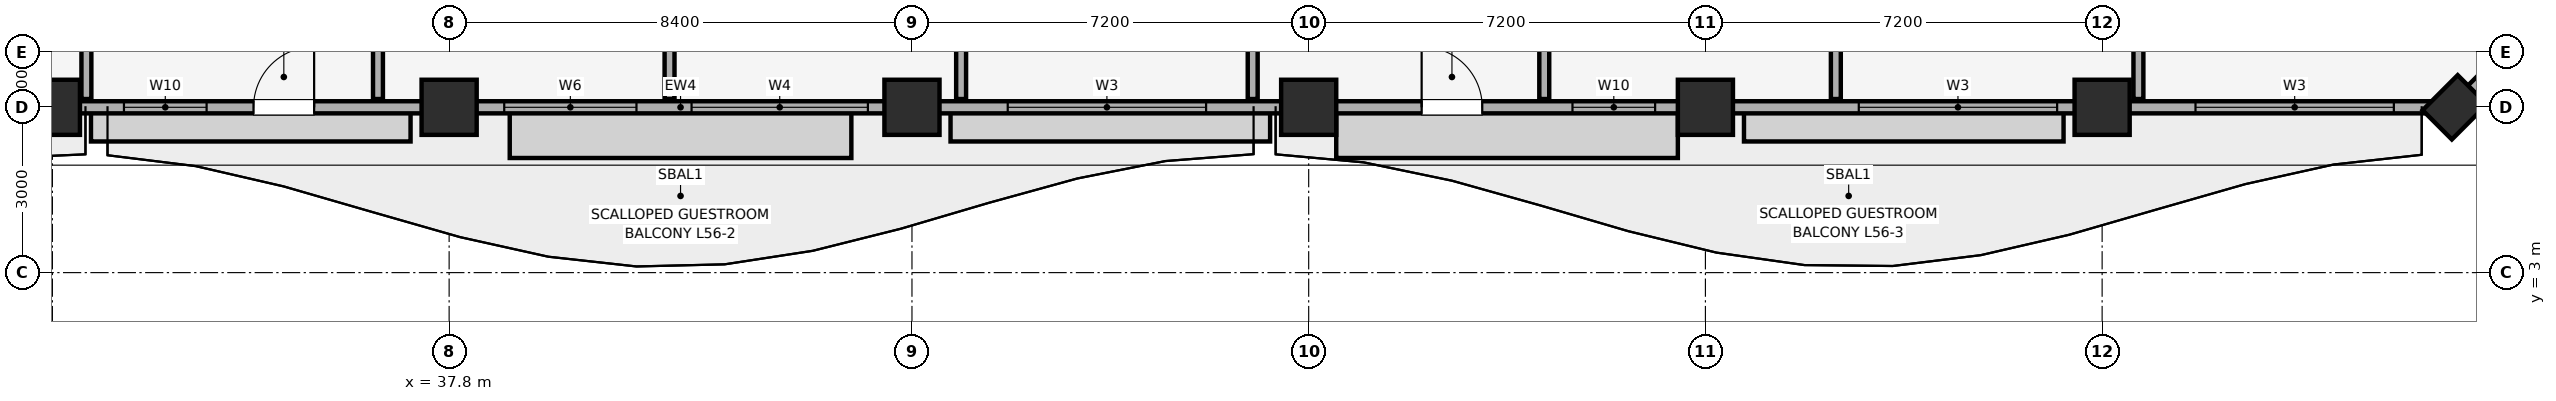
"""IFC4 building model, lengths in metres.
Left out: names, types, materials, properties, quantities, classifications, styles, units other than length and angle.
Written with IfcOpenShell. Run it as: python <this file> out.ifc"""

import sys

from ifc_helpers import new_model, si_unit, direction, frame, frame_2d, origin, origin_2d, place, context, subcontext, project, spatial, rectangle, extrude, element, fill, save


model = new_model("IFC4")
c1 = context("Model", 3, precision=1e-05, world=origin(), true_north=direction((0.0, 1.0)))
c2 = subcontext(c1, "Body", "Model", "MODEL_VIEW")
j1 = project(units=[si_unit("LENGTHUNIT", "METRE"), si_unit("PLANEANGLEUNIT", "RADIAN")], contexts=[c1])
p1 = place(None, origin())
s1 = spatial("IfcSite", under=j1, at=p1, CompositionType="ELEMENT")
p2 = place(p1, origin())
s2 = spatial("IfcBuilding", under=s1, at=p2, CompositionType="ELEMENT")
p3 = place(p2, frame((0.0, 0.0, 229.15)))
s3 = spatial("IfcBuildingStorey", under=s2, at=p3, CompositionType="ELEMENT", Elevation=229.15)
for number, where, z_axis, x_axis in (
    (1, (30.6, 6.0, 0.0), (0.0, 0.0, 1.0), (1.0, 0.0, 0.0)),
    (2, (37.8, 6.0, 0.0), (0.0, 0.0, 1.0), (1.0, 0.0, 0.0)),
    (3, (46.2, 6.0, 0.0), (0.0, 0.0, 1.0), (1.0, 0.0, 0.0)),
    (4, (53.4, 6.0, 0.0), (0.0, 0.0, 1.0), (1.0, 0.0, 0.0)),
    (5, (60.6, 6.0, 0.0), (0.0, 0.0, 1.0), (1.0, 0.0, 0.0)),
    (6, (67.8, 6.0, 0.0), (0.0, 0.0, 1.0), (1.0, 0.0, 0.0)),
):
    element("IfcColumn", number, at=place(p3, frame(where, z_axis=z_axis, x_axis=x_axis)), inside=s3, PredefinedType="COLUMN", context=c2, shape_type="SweptSolid", body=[
        extrude(rectangle(XDim=1.0, YDim=1.0, at=origin_2d()), origin(), (0.0, 0.0, 1.0), 3.71),
    ])
p4 = place(p3, frame((74.2, 6.0, 0.0), z_axis=(0.0, 0.0, 1.0), x_axis=(0.707106781187, 0.707106781187, 0.0)))
e7 = element("IfcColumn", 7, at=p4, inside=s3, PredefinedType="PILASTER", context=c2, shape_type="SweptSolid", body=[
    extrude(rectangle(XDim=0.9, YDim=0.75, at=origin_2d()), origin(), (0.0, 0.0, 1.0), 3.71),
])
p5 = place(p3, frame((9.8, 6.0, 0.0), z_axis=(0.0, 0.0, 1.0), x_axis=(1.0, 0.0, 0.0)))
e8 = element("IfcWall", 8, at=p5, inside=s3, PredefinedType="SOLIDWALL", context=c2, shape_type="SweptSolid", body=[
    extrude(rectangle(XDim=64.4, YDim=0.22, at=frame_2d((32.2, 0.0))), origin(), (0.0, 0.0, 1.0), 2.91),
])
p6 = place(p5, frame((3.25, 0.0, 0.0)))
e9 = element("IfcOpeningElement", 9, at=p6, cuts=e8, PredefinedType="OPENING", context=c2, shape_type="SweptSolid", body=[
    extrude(rectangle(XDim=1.1, YDim=2.15, at=frame_2d((0.55, 1.075))), frame((0.0, 0.12, 0.0), z_axis=(0.0, -1.0, 0.0), x_axis=(1.0, 0.0, 0.0)), (0.0, 0.0, 1.0), 0.24),
])
p7 = place(p5, frame((24.45, 0.0, 0.0)))
e10 = element("IfcOpeningElement", 10, at=p7, cuts=e8, PredefinedType="OPENING", context=c2, shape_type="SweptSolid", body=[
    extrude(rectangle(XDim=1.1, YDim=2.15, at=frame_2d((0.55, 1.075))), frame((0.0, 0.12, 0.0), z_axis=(0.0, -1.0, 0.0), x_axis=(1.0, 0.0, 0.0)), (0.0, 0.0, 1.0), 0.24),
])
p8 = place(p5, frame((45.65, 0.0, 0.0)))
e11 = element("IfcOpeningElement", 11, at=p8, cuts=e8, PredefinedType="OPENING", context=c2, shape_type="SweptSolid", body=[
    extrude(rectangle(XDim=1.1, YDim=2.15, at=frame_2d((0.55, 1.075))), frame((0.0, 0.12, 0.0), z_axis=(0.0, -1.0, 0.0), x_axis=(1.0, 0.0, 0.0)), (0.0, 0.0, 1.0), 0.24),
])
p9 = place(p5, frame((0.825, 0.0, 0.85)))
e12 = element("IfcOpeningElement", 12, at=p9, cuts=e8, PredefinedType="OPENING", context=c2, shape_type="SweptSolid", body=[
    extrude(rectangle(XDim=1.5, YDim=1.4, at=frame_2d((0.75, 0.7))), frame((0.0, 0.12, 0.0), z_axis=(0.0, -1.0, 0.0), x_axis=(1.0, 0.0, 0.0)), (0.0, 0.0, 1.0), 0.24),
])
p10 = place(p5, frame((7.217, 0.0, 0.85)))
e13 = element("IfcOpeningElement", 13, at=p10, cuts=e8, PredefinedType="OPENING", context=c2, shape_type="SweptSolid", body=[
    extrude(rectangle(XDim=3.2, YDim=1.85, at=frame_2d((1.6, 0.925))), frame((0.0, 0.12, 0.0), z_axis=(0.0, -1.0, 0.0), x_axis=(1.0, 0.0, 0.0)), (0.0, 0.0, 1.0), 0.24),
])
p11 = place(p5, frame((11.267, 0.0, 0.85)))
e14 = element("IfcOpeningElement", 14, at=p11, cuts=e8, PredefinedType="OPENING", context=c2, shape_type="SweptSolid", body=[
    extrude(rectangle(XDim=1.5, YDim=1.4, at=frame_2d((0.75, 0.7))), frame((0.0, 0.12, 0.0), z_axis=(0.0, -1.0, 0.0), x_axis=(1.0, 0.0, 0.0)), (0.0, 0.0, 1.0), 0.24),
])
p12 = place(p5, frame((16.663, 0.0, 0.85)))
e15 = element("IfcOpeningElement", 15, at=p12, cuts=e8, PredefinedType="OPENING", context=c2, shape_type="SweptSolid", body=[
    extrude(rectangle(XDim=3.2, YDim=1.85, at=frame_2d((1.6, 0.925))), frame((0.0, 0.12, 0.0), z_axis=(0.0, -1.0, 0.0), x_axis=(1.0, 0.0, 0.0)), (0.0, 0.0, 1.0), 0.24),
])
p13 = place(p5, frame((22.098, 0.0, 0.85)))
e16 = element("IfcOpeningElement", 16, at=p13, cuts=e8, PredefinedType="OPENING", context=c2, shape_type="SweptSolid", body=[
    extrude(rectangle(XDim=1.5, YDim=1.4, at=frame_2d((0.75, 0.7))), frame((0.0, 0.12, 0.0), z_axis=(0.0, -1.0, 0.0), x_axis=(1.0, 0.0, 0.0)), (0.0, 0.0, 1.0), 0.24),
])
p14 = place(p5, frame((29.0, 0.0, 0.85)))
e17 = element("IfcOpeningElement", 17, at=p14, cuts=e8, PredefinedType="OPENING", context=c2, shape_type="SweptSolid", body=[
    extrude(rectangle(XDim=2.4, YDim=1.5, at=frame_2d((1.2, 0.75))), frame((0.0, 0.12, 0.0), z_axis=(0.0, -1.0, 0.0), x_axis=(1.0, 0.0, 0.0)), (0.0, 0.0, 1.0), 0.24),
])
p15 = place(p5, frame((32.4, 0.0, 0.85)))
e18 = element("IfcOpeningElement", 18, at=p15, cuts=e8, PredefinedType="OPENING", context=c2, shape_type="SweptSolid", body=[
    extrude(rectangle(XDim=3.2, YDim=1.85, at=frame_2d((1.6, 0.925))), frame((0.0, 0.12, 0.0), z_axis=(0.0, -1.0, 0.0), x_axis=(1.0, 0.0, 0.0)), (0.0, 0.0, 1.0), 0.24),
])
p16 = place(p5, frame((38.138, 0.0, 0.85)))
e19 = element("IfcOpeningElement", 19, at=p16, cuts=e8, PredefinedType="OPENING", context=c2, shape_type="SweptSolid", body=[
    extrude(rectangle(XDim=3.6, YDim=1.75, at=frame_2d((1.8, 0.875))), frame((0.0, 0.12, 0.0), z_axis=(0.0, -1.0, 0.0), x_axis=(1.0, 0.0, 0.0)), (0.0, 0.0, 1.0), 0.24),
])
p17 = place(p5, frame((48.387, 0.0, 0.85)))
e20 = element("IfcOpeningElement", 20, at=p17, cuts=e8, PredefinedType="OPENING", context=c2, shape_type="SweptSolid", body=[
    extrude(rectangle(XDim=1.5, YDim=1.4, at=frame_2d((0.75, 0.7))), frame((0.0, 0.12, 0.0), z_axis=(0.0, -1.0, 0.0), x_axis=(1.0, 0.0, 0.0)), (0.0, 0.0, 1.0), 0.24),
])
p18 = place(p5, frame((53.583, 0.0, 0.85)))
e21 = element("IfcOpeningElement", 21, at=p18, cuts=e8, PredefinedType="OPENING", context=c2, shape_type="SweptSolid", body=[
    extrude(rectangle(XDim=3.6, YDim=1.75, at=frame_2d((1.8, 0.875))), frame((0.0, 0.12, 0.0), z_axis=(0.0, -1.0, 0.0), x_axis=(1.0, 0.0, 0.0)), (0.0, 0.0, 1.0), 0.24),
])
p19 = place(p5, frame((59.695, 0.0, 0.85)))
e22 = element("IfcOpeningElement", 22, at=p19, cuts=e8, PredefinedType="OPENING", context=c2, shape_type="SweptSolid", body=[
    extrude(rectangle(XDim=3.6, YDim=1.75, at=frame_2d((1.8, 0.875))), frame((0.0, 0.12, 0.0), z_axis=(0.0, -1.0, 0.0), x_axis=(1.0, 0.0, 0.0)), (0.0, 0.0, 1.0), 0.24),
])
p20 = place(p3, frame((74.2, 6.0, 0.0), z_axis=(0.0, 0.0, 1.0), x_axis=(0.707106781187, 0.707106781187, 0.0)))
e23 = element("IfcWall", 23, at=p20, inside=s3, PredefinedType="SOLIDWALL", context=c2, shape_type="SweptSolid", body=[
    extrude(rectangle(XDim=5.374, YDim=0.22, at=frame_2d((2.687, 0.0))), origin(), (0.0, 0.0, 1.0), 2.91),
])
p21 = place(p20, frame((1.637, 0.0, 0.85)))
e24 = element("IfcOpeningElement", 24, at=p21, cuts=e23, PredefinedType="OPENING", context=c2, shape_type="SweptSolid", body=[
    extrude(rectangle(XDim=2.1, YDim=1.6, at=frame_2d((1.05, 0.8))), frame((0.0, 0.12, 0.0), z_axis=(0.0, -1.0, 0.0), x_axis=(1.0, 0.0, 0.0)), (0.0, 0.0, 1.0), 0.24),
])
for number, where, z_axis, x_axis in (
    (25, (31.217, 6.15, 0.0), (0.0, 0.0, 1.0), (0.0, 1.0, 0.0)),
    (26, (36.509, 6.15, 0.0), (0.0, 0.0, 1.0), (0.0, 1.0, 0.0)),
):
    element("IfcWall", number, at=place(p3, frame(where, z_axis=z_axis, x_axis=x_axis)), inside=s3, PredefinedType="PARTITIONING", context=c2, shape_type="SweptSolid", body=[
        extrude(rectangle(XDim=5.355, YDim=0.18, at=frame_2d((2.677, 0.0))), origin(), (0.0, 0.0, 1.0), 3.71),
    ])
p22 = place(p3, frame((41.8, 6.15, 0.0), z_axis=(0.0, 0.0, 1.0), x_axis=(0.0, 1.0, 0.0)))
e27 = element("IfcWall", 27, at=p22, inside=s3, PredefinedType="PARTITIONING", context=c2, shape_type="SweptSolid", body=[
    extrude(rectangle(XDim=5.355, YDim=0.18, at=frame_2d((2.677, 0.0))), origin(), (0.0, 0.0, 1.0), 3.26),
])
for number, where, z_axis, x_axis in (
    (28, (47.092, 6.15, 0.0), (0.0, 0.0, 1.0), (0.0, 1.0, 0.0)),
    (29, (52.384, 6.15, 0.0), (0.0, 0.0, 1.0), (0.0, 1.0, 0.0)),
    (30, (57.676, 6.15, 0.0), (0.0, 0.0, 1.0), (0.0, 1.0, 0.0)),
    (31, (62.967, 6.15, 0.0), (0.0, 0.0, 1.0), (0.0, 1.0, 0.0)),
    (32, (68.458, 6.15, 0.0), (0.0, 0.0, 1.0), (0.0, 1.0, 0.0)),
):
    element("IfcWall", number, at=place(p3, frame(where, z_axis=z_axis, x_axis=x_axis)), inside=s3, PredefinedType="PARTITIONING", context=c2, shape_type="SweptSolid", body=[
        extrude(rectangle(XDim=5.355, YDim=0.18, at=frame_2d((2.677, 0.0))), origin(), (0.0, 0.0, 1.0), 3.71),
    ])
p23 = place(p7, origin())
e33 = element("IfcDoor", 33, at=p23, inside=s3, OperationType="SINGLE_SWING_RIGHT", PredefinedType="DOOR", context=c2, shape_type="SweptSolid", body=[
    extrude(rectangle(XDim=1.1, YDim=2.15, at=frame_2d((0.55, 1.075))), frame((0.0, 0.025, 0.0), z_axis=(0.0, -1.0, 0.0), x_axis=(1.0, 0.0, 0.0)), (0.0, 0.0, 1.0), 0.05),
])
fill(e10, e33)
p24 = place(p8, origin())
e34 = element("IfcDoor", 34, at=p24, inside=s3, OperationType="SINGLE_SWING_LEFT", PredefinedType="DOOR", context=c2, shape_type="SweptSolid", body=[
    extrude(rectangle(XDim=1.1, YDim=2.15, at=frame_2d((0.55, 1.075))), frame((0.0, 0.025, 0.0), z_axis=(0.0, -1.0, 0.0), x_axis=(1.0, 0.0, 0.0)), (0.0, 0.0, 1.0), 0.05),
])
fill(e11, e34)
p25 = place(p13, origin())
e35 = element("IfcWindow", 35, at=p25, inside=s3, PartitioningType="SINGLE_PANEL", PredefinedType="WINDOW", context=c2, shape_type="SweptSolid", body=[
    extrude(rectangle(XDim=1.5, YDim=1.4, at=frame_2d((0.75, 0.7))), frame((0.0, 0.03, 0.0), z_axis=(0.0, -1.0, 0.0), x_axis=(1.0, 0.0, 0.0)), (0.0, 0.0, 1.0), 0.06),
])
fill(e16, e35)
p26 = place(p14, origin())
e36 = element("IfcWindow", 36, at=p26, inside=s3, PartitioningType="SINGLE_PANEL", PredefinedType="WINDOW", context=c2, shape_type="SweptSolid", body=[
    extrude(rectangle(XDim=2.4, YDim=1.5, at=frame_2d((1.2, 0.75))), frame((0.0, 0.03, 0.0), z_axis=(0.0, -1.0, 0.0), x_axis=(1.0, 0.0, 0.0)), (0.0, 0.0, 1.0), 0.06),
])
fill(e17, e36)
p27 = place(p15, origin())
e37 = element("IfcWindow", 37, at=p27, inside=s3, PartitioningType="SINGLE_PANEL", PredefinedType="WINDOW", context=c2, shape_type="SweptSolid", body=[
    extrude(rectangle(XDim=3.2, YDim=1.85, at=frame_2d((1.6, 0.925))), frame((0.0, 0.03, 0.0), z_axis=(0.0, -1.0, 0.0), x_axis=(1.0, 0.0, 0.0)), (0.0, 0.0, 1.0), 0.06),
])
fill(e18, e37)
p28 = place(p16, origin())
e38 = element("IfcWindow", 38, at=p28, inside=s3, PartitioningType="SINGLE_PANEL", PredefinedType="WINDOW", context=c2, shape_type="SweptSolid", body=[
    extrude(rectangle(XDim=3.6, YDim=1.75, at=frame_2d((1.8, 0.875))), frame((0.0, 0.03, 0.0), z_axis=(0.0, -1.0, 0.0), x_axis=(1.0, 0.0, 0.0)), (0.0, 0.0, 1.0), 0.06),
])
fill(e19, e38)
p29 = place(p17, origin())
e39 = element("IfcWindow", 39, at=p29, inside=s3, PartitioningType="SINGLE_PANEL", PredefinedType="WINDOW", context=c2, shape_type="SweptSolid", body=[
    extrude(rectangle(XDim=1.5, YDim=1.4, at=frame_2d((0.75, 0.7))), frame((0.0, 0.03, 0.0), z_axis=(0.0, -1.0, 0.0), x_axis=(1.0, 0.0, 0.0)), (0.0, 0.0, 1.0), 0.06),
])
fill(e20, e39)
p30 = place(p18, origin())
e40 = element("IfcWindow", 40, at=p30, inside=s3, PartitioningType="SINGLE_PANEL", PredefinedType="WINDOW", context=c2, shape_type="SweptSolid", body=[
    extrude(rectangle(XDim=3.6, YDim=1.75, at=frame_2d((1.8, 0.875))), frame((0.0, 0.03, 0.0), z_axis=(0.0, -1.0, 0.0), x_axis=(1.0, 0.0, 0.0)), (0.0, 0.0, 1.0), 0.06),
])
fill(e21, e40)
p31 = place(p19, origin())
e41 = element("IfcWindow", 41, at=p31, inside=s3, PartitioningType="SINGLE_PANEL", PredefinedType="WINDOW", context=c2, shape_type="SweptSolid", body=[
    extrude(rectangle(XDim=3.6, YDim=1.75, at=frame_2d((1.8, 0.875))), frame((0.0, 0.03, 0.0), z_axis=(0.0, -1.0, 0.0), x_axis=(1.0, 0.0, 0.0)), (0.0, 0.0, 1.0), 0.06),
])
fill(e22, e41)
save(model, sys.argv[1])
